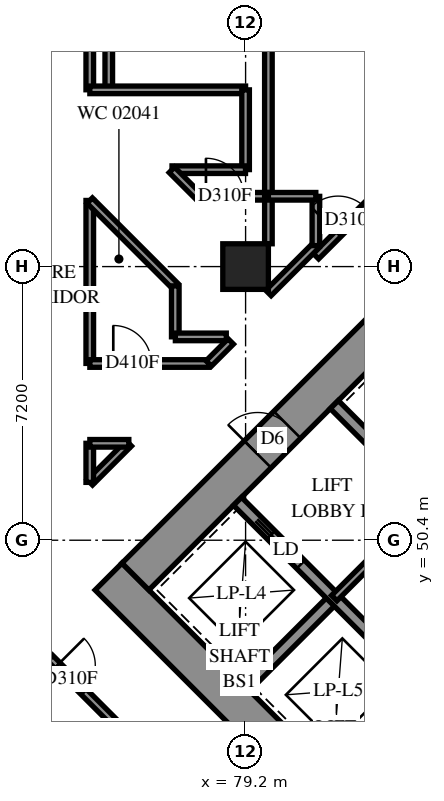
"""IFC4 building model, lengths in metres.
Left out: names, types, materials, properties, quantities, classifications, styles, units other than length and angle.
Written with IfcOpenShell. Run it as: python <this file> out.ifc"""

import sys

from ifc_helpers import new_model, si_unit, direction, frame, frame_2d, origin, origin_2d, place, context, subcontext, project, spatial, polyline, rectangle, outline, extrude, element, fill, save


model = new_model("IFC4")
c1 = context("Model", 3, precision=1e-05, world=origin(), true_north=direction((0.0, 1.0)))
c2 = subcontext(c1, "Body", "Model", "MODEL_VIEW")
j1 = project(units=[si_unit("LENGTHUNIT", "METRE"), si_unit("PLANEANGLEUNIT", "RADIAN")], contexts=[c1])
p1 = place(None, origin())
s1 = spatial("IfcSite", under=j1, at=p1, CompositionType="ELEMENT")
p2 = place(p1, origin())
s2 = spatial("IfcBuilding", under=s1, at=p2, CompositionType="ELEMENT")
p3 = place(p2, frame((0.0, 0.0, 10.2)))
s3 = spatial("IfcBuildingStorey", under=s2, at=p3, CompositionType="ELEMENT", Elevation=10.2)
p4 = place(p3, frame((79.2, 57.6, 0.0), z_axis=(0.0, 0.0, 1.0), x_axis=(1.0, 0.0, 0.0)))
e1 = element("IfcColumn", 1, at=p4, inside=s3, PredefinedType="COLUMN", context=c2, shape_type="SweptSolid", body=[
    extrude(rectangle(XDim=1.2, YDim=1.2, at=origin_2d()), origin(), (0.0, 0.0, 1.0), 3.8),
])
p5 = place(p3, frame((75.594, 49.443, -0.4), z_axis=(0.0, 0.0, 1.0), x_axis=(0.7071037324, -0.70710983, 0.0)))
e2 = element("IfcWall", 2, at=p5, inside=s3, PredefinedType="SHEAR", context=c2, shape_type="SweptSolid", body=[
    extrude(rectangle(XDim=16.4, YDim=1.0, at=frame_2d((8.2, 0.0))), origin(), (0.0, 0.0, 1.0), 3.5),
])
p6 = place(p3, frame((76.301, 49.443, -0.4), z_axis=(0.0, 0.0, 1.0), x_axis=(0.7071067812, 0.7071067812, 0.0)))
e3 = element("IfcWall", 3, at=p6, inside=s3, PredefinedType="SHEAR", context=c2, shape_type="SweptSolid", body=[
    extrude(rectangle(XDim=14.4, YDim=1.0, at=frame_2d((7.2, 0.0))), origin(), (0.0, 0.0, 1.0), 3.5),
])
p7 = place(p6, frame((4.55, 0.0, 0.4)))
e4 = element("IfcOpeningElement", 4, at=p7, cuts=e3, PredefinedType="OPENING", context=c2, shape_type="SweptSolid", body=[
    extrude(rectangle(XDim=1.1, YDim=2.1, at=frame_2d((0.55, 1.05))), frame((0.0, 0.51, 0.0), z_axis=(0.0, -1.0, 0.0), x_axis=(1.0, 0.0, 0.0)), (0.0, 0.0, 1.0), 1.02),
])
p8 = place(p6, frame((11.35, 0.0, 0.4)))
e5 = element("IfcOpeningElement", 5, at=p8, cuts=e3, PredefinedType="OPENING", context=c2, shape_type="SweptSolid", body=[
    extrude(rectangle(XDim=1.1, YDim=2.1, at=frame_2d((0.55, 1.05))), frame((0.0, 0.51, 0.0), z_axis=(0.0, -1.0, 0.0), x_axis=(1.0, 0.0, 0.0)), (0.0, 0.0, 1.0), 1.02),
])
p9 = place(p3, frame((79.2, 46.544, 0.0), z_axis=(0.0, 0.0, 1.0), x_axis=(0.7071219326, 0.7070916295, 0.0)))
e6 = element("IfcWall", 6, at=p9, inside=s3, PredefinedType="SOLIDWALL", context=c2, shape_type="SweptSolid", body=[
    extrude(rectangle(XDim=3.3, YDim=0.3, at=frame_2d((1.65, 0.0))), origin(), (0.0, 0.0, 1.0), 3.8),
])
p10 = place(p3, frame((81.746, 43.999, 0.0), z_axis=(0.0, 0.0, 1.0), x_axis=(0.7071067812, 0.7071067812, 0.0)))
e7 = element("IfcWall", 7, at=p10, inside=s3, PredefinedType="SOLIDWALL", context=c2, shape_type="SweptSolid", body=[
    extrude(rectangle(XDim=3.3, YDim=0.3, at=frame_2d((1.65, 0.0))), origin(), (0.0, 0.0, 1.0), 3.8),
])
p11 = place(p3, frame((78.988, 51.423, 0.0), z_axis=(0.0, 0.0, 1.0), x_axis=(0.7071067812, -0.7071067812, 0.0)))
e8 = element("IfcWall", 8, at=p11, inside=s3, PredefinedType="SOLIDWALL", context=c2, shape_type="SweptSolid", body=[
    extrude(rectangle(XDim=14.4, YDim=0.3, at=frame_2d((7.2, 0.0))), origin(), (0.0, 0.0, 1.0), 3.8),
])
p12 = place(p11, frame((1.25, 0.0, 0.0)))
e9 = element("IfcOpeningElement", 9, at=p12, cuts=e8, PredefinedType="OPENING", context=c2, shape_type="SweptSolid", body=[
    extrude(rectangle(XDim=1.1, YDim=2.1, at=frame_2d((0.55, 1.05))), frame((0.0, 0.16, 0.0), z_axis=(0.0, -1.0, 0.0), x_axis=(1.0, 0.0, 0.0)), (0.0, 0.0, 1.0), 0.32),
])
p13 = place(p11, frame((4.85, 0.0, 0.0)))
e10 = element("IfcOpeningElement", 10, at=p13, cuts=e8, PredefinedType="OPENING", context=c2, shape_type="SweptSolid", body=[
    extrude(rectangle(XDim=1.1, YDim=2.1, at=frame_2d((0.55, 1.05))), frame((0.0, 0.16, 0.0), z_axis=(0.0, -1.0, 0.0), x_axis=(1.0, 0.0, 0.0)), (0.0, 0.0, 1.0), 0.32),
])
p14 = place(p11, frame((8.45, 0.0, 0.0)))
e11 = element("IfcOpeningElement", 11, at=p14, cuts=e8, PredefinedType="OPENING", context=c2, shape_type="SweptSolid", body=[
    extrude(rectangle(XDim=1.1, YDim=2.1, at=frame_2d((0.55, 1.05))), frame((0.0, 0.16, 0.0), z_axis=(0.0, -1.0, 0.0), x_axis=(1.0, 0.0, 0.0)), (0.0, 0.0, 1.0), 0.32),
])
p15 = place(p11, frame((12.05, 0.0, 0.0)))
e12 = element("IfcOpeningElement", 12, at=p15, cuts=e8, PredefinedType="OPENING", context=c2, shape_type="SweptSolid", body=[
    extrude(rectangle(XDim=1.1, YDim=2.1, at=frame_2d((0.55, 1.05))), frame((0.0, 0.16, 0.0), z_axis=(0.0, -1.0, 0.0), x_axis=(1.0, 0.0, 0.0)), (0.0, 0.0, 1.0), 0.32),
])
p16 = place(p3, frame((81.534, 53.969, 0.0), z_axis=(0.0, 0.0, 1.0), x_axis=(0.707103309, -0.7071102534, 0.0)))
e13 = element("IfcWall", 13, at=p16, inside=s3, PredefinedType="SOLIDWALL", context=c2, shape_type="SweptSolid", body=[
    extrude(rectangle(XDim=14.4, YDim=0.3, at=frame_2d((7.2, 0.0))), origin(), (0.0, 0.0, 1.0), 3.8),
])
p17 = place(p16, frame((12.05, 0.0, 0.0)))
e14 = element("IfcOpeningElement", 14, at=p17, cuts=e13, PredefinedType="OPENING", context=c2, shape_type="SweptSolid", body=[
    extrude(rectangle(XDim=1.1, YDim=2.1, at=frame_2d((0.55, 1.05))), frame((0.0, 0.16, 0.0), z_axis=(0.0, -1.0, 0.0), x_axis=(1.0, 0.0, 0.0)), (0.0, 0.0, 1.0), 0.32),
])
p18 = place(p3, frame((117.843, 34.665, 0.0), z_axis=(0.0, 0.0, 1.0), x_axis=(-0.7071067812, 0.7071067812, 0.0)))
e15 = element("IfcWall", 15, at=p18, inside=s3, PredefinedType="SOLIDWALL", context=c2, shape_type="SweptSolid", body=[
    extrude(outline(polyline([(-0.275, -0.275), (54.222, -0.275), (53.994, 0.275), (0.275, 0.275), (-0.275, -0.275)])), origin(), (0.0, 0.0, 1.0), 3.8),
])
p19 = place(p18, frame((0.8, 0.0, 0.7)))
e16 = element("IfcOpeningElement", 16, at=p19, cuts=e15, PredefinedType="OPENING", context=c2, shape_type="SweptSolid", body=[
    extrude(rectangle(XDim=1.8, YDim=2.6, at=frame_2d((0.9, 1.3))), frame((0.0, 0.285, 0.0), z_axis=(0.0, -1.0, 0.0), x_axis=(1.0, 0.0, 0.0)), (0.0, 0.0, 1.0), 0.57),
])
p20 = place(p18, frame((4.225, 0.0, 0.7)))
e17 = element("IfcOpeningElement", 17, at=p20, cuts=e15, PredefinedType="OPENING", context=c2, shape_type="SweptSolid", body=[
    extrude(rectangle(XDim=1.8, YDim=2.6, at=frame_2d((0.9, 1.3))), frame((0.0, 0.285, 0.0), z_axis=(0.0, -1.0, 0.0), x_axis=(1.0, 0.0, 0.0)), (0.0, 0.0, 1.0), 0.57),
])
p21 = place(p18, frame((7.825, 0.0, 0.7)))
e18 = element("IfcOpeningElement", 18, at=p21, cuts=e15, PredefinedType="OPENING", context=c2, shape_type="SweptSolid", body=[
    extrude(rectangle(XDim=1.8, YDim=2.6, at=frame_2d((0.9, 1.3))), frame((0.0, 0.285, 0.0), z_axis=(0.0, -1.0, 0.0), x_axis=(1.0, 0.0, 0.0)), (0.0, 0.0, 1.0), 0.57),
])
p22 = place(p18, frame((11.425, 0.0, 0.7)))
e19 = element("IfcOpeningElement", 19, at=p22, cuts=e15, PredefinedType="OPENING", context=c2, shape_type="SweptSolid", body=[
    extrude(rectangle(XDim=1.8, YDim=2.6, at=frame_2d((0.9, 1.3))), frame((0.0, 0.285, 0.0), z_axis=(0.0, -1.0, 0.0), x_axis=(1.0, 0.0, 0.0)), (0.0, 0.0, 1.0), 0.57),
])
p23 = place(p18, frame((15.025, 0.0, 0.7)))
e20 = element("IfcOpeningElement", 20, at=p23, cuts=e15, PredefinedType="OPENING", context=c2, shape_type="SweptSolid", body=[
    extrude(rectangle(XDim=1.8, YDim=2.6, at=frame_2d((0.9, 1.3))), frame((0.0, 0.285, 0.0), z_axis=(0.0, -1.0, 0.0), x_axis=(1.0, 0.0, 0.0)), (0.0, 0.0, 1.0), 0.57),
])
p24 = place(p18, frame((18.625, 0.0, 0.7)))
e21 = element("IfcOpeningElement", 21, at=p24, cuts=e15, PredefinedType="OPENING", context=c2, shape_type="SweptSolid", body=[
    extrude(rectangle(XDim=1.8, YDim=2.6, at=frame_2d((0.9, 1.3))), frame((0.0, 0.285, 0.0), z_axis=(0.0, -1.0, 0.0), x_axis=(1.0, 0.0, 0.0)), (0.0, 0.0, 1.0), 0.57),
])
p25 = place(p18, frame((22.225, 0.0, 0.7)))
e22 = element("IfcOpeningElement", 22, at=p25, cuts=e15, PredefinedType="OPENING", context=c2, shape_type="SweptSolid", body=[
    extrude(rectangle(XDim=1.8, YDim=2.6, at=frame_2d((0.9, 1.3))), frame((0.0, 0.285, 0.0), z_axis=(0.0, -1.0, 0.0), x_axis=(1.0, 0.0, 0.0)), (0.0, 0.0, 1.0), 0.57),
])
p26 = place(p18, frame((25.825, 0.0, 0.7)))
e23 = element("IfcOpeningElement", 23, at=p26, cuts=e15, PredefinedType="OPENING", context=c2, shape_type="SweptSolid", body=[
    extrude(rectangle(XDim=1.8, YDim=2.6, at=frame_2d((0.9, 1.3))), frame((0.0, 0.285, 0.0), z_axis=(0.0, -1.0, 0.0), x_axis=(1.0, 0.0, 0.0)), (0.0, 0.0, 1.0), 0.57),
])
p27 = place(p18, frame((29.425, 0.0, 0.7)))
e24 = element("IfcOpeningElement", 24, at=p27, cuts=e15, PredefinedType="OPENING", context=c2, shape_type="SweptSolid", body=[
    extrude(rectangle(XDim=1.8, YDim=2.6, at=frame_2d((0.9, 1.3))), frame((0.0, 0.285, 0.0), z_axis=(0.0, -1.0, 0.0), x_axis=(1.0, 0.0, 0.0)), (0.0, 0.0, 1.0), 0.57),
])
p28 = place(p18, frame((33.025, 0.0, 0.7)))
e25 = element("IfcOpeningElement", 25, at=p28, cuts=e15, PredefinedType="OPENING", context=c2, shape_type="SweptSolid", body=[
    extrude(rectangle(XDim=1.8, YDim=2.6, at=frame_2d((0.9, 1.3))), frame((0.0, 0.285, 0.0), z_axis=(0.0, -1.0, 0.0), x_axis=(1.0, 0.0, 0.0)), (0.0, 0.0, 1.0), 0.57),
])
p29 = place(p18, frame((36.625, 0.0, 0.7)))
e26 = element("IfcOpeningElement", 26, at=p29, cuts=e15, PredefinedType="OPENING", context=c2, shape_type="SweptSolid", body=[
    extrude(rectangle(XDim=1.8, YDim=2.6, at=frame_2d((0.9, 1.3))), frame((0.0, 0.285, 0.0), z_axis=(0.0, -1.0, 0.0), x_axis=(1.0, 0.0, 0.0)), (0.0, 0.0, 1.0), 0.57),
])
p30 = place(p18, frame((40.225, 0.0, 0.7)))
e27 = element("IfcOpeningElement", 27, at=p30, cuts=e15, PredefinedType="OPENING", context=c2, shape_type="SweptSolid", body=[
    extrude(rectangle(XDim=1.8, YDim=2.6, at=frame_2d((0.9, 1.3))), frame((0.0, 0.285, 0.0), z_axis=(0.0, -1.0, 0.0), x_axis=(1.0, 0.0, 0.0)), (0.0, 0.0, 1.0), 0.57),
])
p31 = place(p18, frame((43.825, 0.0, 0.7)))
e28 = element("IfcOpeningElement", 28, at=p31, cuts=e15, PredefinedType="OPENING", context=c2, shape_type="SweptSolid", body=[
    extrude(rectangle(XDim=1.8, YDim=2.6, at=frame_2d((0.9, 1.3))), frame((0.0, 0.285, 0.0), z_axis=(0.0, -1.0, 0.0), x_axis=(1.0, 0.0, 0.0)), (0.0, 0.0, 1.0), 0.57),
])
p32 = place(p18, frame((47.425, 0.0, 0.7)))
e29 = element("IfcOpeningElement", 29, at=p32, cuts=e15, PredefinedType="OPENING", context=c2, shape_type="SweptSolid", body=[
    extrude(rectangle(XDim=1.8, YDim=2.6, at=frame_2d((0.9, 1.3))), frame((0.0, 0.285, 0.0), z_axis=(0.0, -1.0, 0.0), x_axis=(1.0, 0.0, 0.0)), (0.0, 0.0, 1.0), 0.57),
])
p33 = place(p18, frame((50.96, 0.0, 0.7)))
e30 = element("IfcOpeningElement", 30, at=p33, cuts=e15, PredefinedType="OPENING", context=c2, shape_type="SweptSolid", body=[
    extrude(rectangle(XDim=1.8, YDim=2.6, at=frame_2d((0.9, 1.3))), frame((0.0, 0.285, 0.0), z_axis=(0.0, -1.0, 0.0), x_axis=(1.0, 0.0, 0.0)), (0.0, 0.0, 1.0), 0.57),
])
p34 = place(p3, frame((81.534, 48.878, 0.0), z_axis=(0.0, 0.0, 1.0), x_axis=(0.707092892, 0.7071206701, 0.0)))
e31 = element("IfcWall", 31, at=p34, inside=s3, PredefinedType="PARTITIONING", context=c2, shape_type="SweptSolid", body=[
    extrude(rectangle(XDim=3.6, YDim=0.2, at=frame_2d((1.8, 0.0))), origin(), (0.0, 0.0, 1.0), 3.8),
])
p35 = place(p3, frame((75.6, 62.25, 0.0), z_axis=(0.0, 0.0, 1.0), x_axis=(0.0, 1.0, 0.0)))
e32 = element("IfcWall", 32, at=p35, inside=s3, PredefinedType="PARTITIONING", context=c2, shape_type="SweptSolid", body=[
    extrude(rectangle(XDim=10.4, YDim=0.2, at=frame_2d((5.2, 0.0))), origin(), (0.0, 0.0, 1.0), 3.8),
])
p36 = place(p3, frame((81.052, 57.873, 0.0), z_axis=(0.0, 0.0, 1.0), x_axis=(0.7071067812, 0.7071067812, 0.0)))
e33 = element("IfcWall", 33, at=p36, inside=s3, PredefinedType="PARTITIONING", context=c2, shape_type="SweptSolid", body=[
    extrude(rectangle(XDim=8.18, YDim=0.2, at=frame_2d((4.09, 0.0))), origin(), (0.0, 0.0, 1.0), 3.8),
])
p37 = place(p36, frame((0.823, 0.0, 0.0)))
e34 = element("IfcOpeningElement", 34, at=p37, cuts=e33, PredefinedType="OPENING", context=c2, shape_type="SweptSolid", body=[
    extrude(rectangle(XDim=1.0, YDim=2.1, at=frame_2d((0.5, 1.05))), frame((0.0, 0.11, 0.0), z_axis=(0.0, -1.0, 0.0), x_axis=(1.0, 0.0, 0.0)), (0.0, 0.0, 1.0), 0.22),
])
p38 = place(p3, frame((75.1, 62.252, 0.0), z_axis=(0.0, 0.0, 1.0), x_axis=(0.0, 1.0, 0.0)))
e35 = element("IfcWall", 35, at=p38, inside=s3, PredefinedType="PARTITIONING", context=c2, shape_type="SweptSolid", body=[
    extrude(rectangle(XDim=5.648, YDim=0.2, at=frame_2d((2.824, 0.0))), origin(), (0.0, 0.0, 1.0), 3.8),
])
p39 = place(p3, frame((79.8, 59.45, 0.0), z_axis=(0.0, 0.0, 1.0), x_axis=(0.0, 1.0, 0.0)))
e36 = element("IfcWall", 36, at=p39, inside=s3, PredefinedType="PARTITIONING", context=c2, shape_type="SweptSolid", body=[
    extrude(rectangle(XDim=4.75, YDim=0.2, at=frame_2d((2.375, 0.0))), origin(), (0.0, 0.0, 1.0), 3.8),
])
p40 = place(p3, frame((74.057, 47.297, 0.0), z_axis=(0.0, 0.0, 1.0), x_axis=(0.7071067812, -0.7071067812, 0.0)))
e37 = element("IfcWall", 37, at=p40, inside=s3, PredefinedType="PARTITIONING", context=c2, shape_type="SweptSolid", body=[
    extrude(rectangle(XDim=4.653, YDim=0.2, at=frame_2d((2.326, 0.0))), origin(), (0.0, 0.0, 1.0), 3.8),
])
p41 = place(p40, frame((0.267, 0.0, 0.0)))
e38 = element("IfcOpeningElement", 38, at=p41, cuts=e37, PredefinedType="OPENING", context=c2, shape_type="SweptSolid", body=[
    extrude(rectangle(XDim=1.0, YDim=2.1, at=frame_2d((0.5, 1.05))), frame((0.0, 0.11, 0.0), z_axis=(0.0, -1.0, 0.0), x_axis=(1.0, 0.0, 0.0)), (0.0, 0.0, 1.0), 0.22),
])
p42 = place(p3, frame((75.1, 55.052, 0.0), z_axis=(0.0, 0.0, 1.0), x_axis=(0.0, 1.0, 0.0)))
e39 = element("IfcWall", 39, at=p42, inside=s3, PredefinedType="PARTITIONING", context=c2, shape_type="SweptSolid", body=[
    extrude(rectangle(XDim=4.288, YDim=0.2, at=frame_2d((2.144, 0.0))), origin(), (0.0, 0.0, 1.0), 3.8),
])
p43 = place(p3, frame((75.102, 62.25, 0.0), z_axis=(0.0, 0.0, 1.0), x_axis=(1.0, 0.0, 0.0)))
e40 = element("IfcWall", 40, at=p43, inside=s3, PredefinedType="PARTITIONING", context=c2, shape_type="SweptSolid", body=[
    extrude(rectangle(XDim=4.098, YDim=0.2, at=frame_2d((2.049, 0.0))), origin(), (0.0, 0.0, 1.0), 3.8),
])
p44 = place(p3, frame((75.099, 59.337, 0.0), z_axis=(0.0, 0.0, 1.0), x_axis=(0.7071067812, -0.7071067812, 0.0)))
e41 = element("IfcWall", 41, at=p44, inside=s3, PredefinedType="PARTITIONING", context=c2, shape_type="SweptSolid", body=[
    extrude(rectangle(XDim=3.179, YDim=0.2, at=frame_2d((1.59, 0.0))), origin(), (0.0, 0.0, 1.0), 3.8),
])
p45 = place(p3, frame((75.102, 55.05, 0.0), z_axis=(0.0, 0.0, 1.0), x_axis=(1.0, 0.0, 0.0)))
e42 = element("IfcWall", 42, at=p45, inside=s3, PredefinedType="PARTITIONING", context=c2, shape_type="SweptSolid", body=[
    extrude(rectangle(XDim=3.128, YDim=0.2, at=frame_2d((1.564, 0.0))), origin(), (0.0, 0.0, 1.0), 3.8),
])
p46 = place(p45, frame((0.617, 0.0, 0.0)))
e43 = element("IfcOpeningElement", 43, at=p46, cuts=e42, PredefinedType="OPENING", context=c2, shape_type="SweptSolid", body=[
    extrude(rectangle(XDim=1.0, YDim=2.1, at=frame_2d((0.5, 1.05))), frame((0.0, 0.11, 0.0), z_axis=(0.0, -1.0, 0.0), x_axis=(1.0, 0.0, 0.0)), (0.0, 0.0, 1.0), 0.22),
])
p47 = place(p3, frame((79.2, 60.152, 0.0), z_axis=(0.0, 0.0, 1.0), x_axis=(0.0, 1.0, 0.0)))
e44 = element("IfcWall", 44, at=p47, inside=s3, PredefinedType="PARTITIONING", context=c2, shape_type="SweptSolid", body=[
    extrude(rectangle(XDim=2.098, YDim=0.2, at=frame_2d((1.049, 0.0))), origin(), (0.0, 0.0, 1.0), 3.8),
])
p48 = place(p3, frame((77.264, 60.15, 0.0), z_axis=(0.0, 0.0, 1.0), x_axis=(1.0, 0.0, 0.0)))
e45 = element("IfcWall", 45, at=p48, inside=s3, PredefinedType="PARTITIONING", context=c2, shape_type="SweptSolid", body=[
    extrude(rectangle(XDim=1.934, YDim=0.2, at=frame_2d((0.967, 0.0))), origin(), (0.0, 0.0, 1.0), 3.8),
])
p49 = place(p3, frame((77.962, 59.45, 0.0), z_axis=(0.0, 0.0, 1.0), x_axis=(1.0, 0.0, 0.0)))
e46 = element("IfcWall", 46, at=p49, inside=s3, PredefinedType="PARTITIONING", context=c2, shape_type="SweptSolid", body=[
    extrude(rectangle(XDim=1.838, YDim=0.2, at=frame_2d((0.919, 0.0))), origin(), (0.0, 0.0, 1.0), 3.8),
])
p50 = place(p49, frame((0.195, 0.0, 0.0)))
e47 = element("IfcOpeningElement", 47, at=p50, cuts=e46, PredefinedType="OPENING", context=c2, shape_type="SweptSolid", body=[
    extrude(rectangle(XDim=1.0, YDim=2.1, at=frame_2d((0.5, 1.05))), frame((0.0, 0.11, 0.0), z_axis=(0.0, -1.0, 0.0), x_axis=(1.0, 0.0, 0.0)), (0.0, 0.0, 1.0), 0.22),
])
p51 = place(p3, frame((79.801, 56.905, 0.0), z_axis=(0.0, 0.0, 1.0), x_axis=(0.7071067812, 0.7071067812, 0.0)))
e48 = element("IfcWall", 48, at=p51, inside=s3, PredefinedType="PARTITIONING", context=c2, shape_type="SweptSolid", body=[
    extrude(rectangle(XDim=1.765, YDim=0.2, at=frame_2d((0.882, 0.0))), origin(), (0.0, 0.0, 1.0), 3.8),
])
p52 = place(p3, frame((75.102, 51.922, 0.0), z_axis=(0.0, 0.0, 1.0), x_axis=(0.7071067812, 0.7071067812, 0.0)))
e49 = element("IfcWall", 49, at=p52, inside=s3, PredefinedType="PARTITIONING", context=c2, shape_type="SweptSolid", body=[
    extrude(rectangle(XDim=1.451, YDim=0.2, at=frame_2d((0.726, 0.0))), origin(), (0.0, 0.0, 1.0), 3.8),
])
for number, where, z_axis, x_axis in (
    (50, (77.35, 55.752, 0.0), (0.0, 0.0, 1.0), (0.0, 1.0, 0.0)),
    (51, (77.352, 55.75, 0.0), (0.0, 0.0, 1.0), (1.0, 0.0, 0.0)),
):
    element("IfcWall", number, at=place(p3, frame(where, z_axis=z_axis, x_axis=x_axis)), inside=s3, PredefinedType="PARTITIONING", context=c2, shape_type="SweptSolid", body=[
        extrude(rectangle(XDim=1.34, YDim=0.2, at=frame_2d((0.67, 0.0))), origin(), (0.0, 0.0, 1.0), 3.8),
    ])
p53 = place(p3, frame((81.05, 58.152, 0.0), z_axis=(0.0, 0.0, 1.0), x_axis=(0.0, 1.0, 0.0)))
e52 = element("IfcWall", 52, at=p53, inside=s3, PredefinedType="PARTITIONING", context=c2, shape_type="SweptSolid", body=[
    extrude(rectangle(XDim=1.296, YDim=0.2, at=frame_2d((0.648, 0.0))), origin(), (0.0, 0.0, 1.0), 3.8),
])
p54 = place(p3, frame((79.8, 58.2, 0.0), z_axis=(0.0, 0.0, 1.0), x_axis=(0.0, 1.0, 0.0)))
e53 = element("IfcWall", 53, at=p54, inside=s3, PredefinedType="PARTITIONING", context=c2, shape_type="SweptSolid", body=[
    extrude(rectangle(XDim=1.25, YDim=0.2, at=frame_2d((0.625, 0.0))), origin(), (0.0, 0.0, 1.0), 3.8),
])
p55 = place(p3, frame((79.8, 59.45, 0.0), z_axis=(0.0, 0.0, 1.0), x_axis=(1.0, 0.0, 0.0)))
e54 = element("IfcWall", 54, at=p55, inside=s3, PredefinedType="PARTITIONING", context=c2, shape_type="SweptSolid", body=[
    extrude(rectangle(XDim=1.248, YDim=0.2, at=frame_2d((0.624, 0.0))), origin(), (0.0, 0.0, 1.0), 3.8),
])
p56 = place(p3, frame((75.1, 51.922, 0.0), z_axis=(0.0, 0.0, 1.0), x_axis=(0.0, 1.0, 0.0)))
e55 = element("IfcWall", 55, at=p56, inside=s3, PredefinedType="PARTITIONING", context=c2, shape_type="SweptSolid", body=[
    extrude(rectangle(XDim=1.028, YDim=0.2, at=frame_2d((0.514, 0.0))), origin(), (0.0, 0.0, 1.0), 3.8),
])
p57 = place(p3, frame((75.102, 52.95, 0.0), z_axis=(0.0, 0.0, 1.0), x_axis=(1.0, 0.0, 0.0)))
e56 = element("IfcWall", 56, at=p57, inside=s3, PredefinedType="PARTITIONING", context=c2, shape_type="SweptSolid", body=[
    extrude(rectangle(XDim=1.026, YDim=0.2, at=frame_2d((0.513, 0.0))), origin(), (0.0, 0.0, 1.0), 3.8),
])
p58 = place(p3, frame((77.26, 60.145, 0.0), z_axis=(0.0, 0.0, 1.0), x_axis=(0.7071067812, -0.7071067812, 0.0)))
e57 = element("IfcWall", 57, at=p58, inside=s3, PredefinedType="PARTITIONING", context=c2, shape_type="SweptSolid", body=[
    extrude(rectangle(XDim=0.987, YDim=0.2, at=frame_2d((0.493, 0.0))), origin(), (0.0, 0.0, 1.0), 3.8),
])
p59 = place(p3, frame((78.23, 55.05, 0.0), z_axis=(0.0, 0.0, 1.0), x_axis=(0.7071067812, 0.7071067812, 0.0)))
e58 = element("IfcWall", 58, at=p59, inside=s3, PredefinedType="PARTITIONING", context=c2, shape_type="SweptSolid", body=[
    extrude(rectangle(XDim=0.82, YDim=0.2, at=frame_2d((0.41, 0.0))), origin(), (0.0, 0.0, 1.0), 3.8),
])
p60 = place(p7, origin())
e59 = element("IfcDoor", 59, at=p60, inside=s3, OperationType="DOUBLE_DOOR_SINGLE_SWING", PredefinedType="DOOR", context=c2, shape_type="SweptSolid", body=[
    extrude(rectangle(XDim=1.1, YDim=2.1, at=frame_2d((0.55, 1.05))), frame((0.0, 0.025, 0.0), z_axis=(0.0, -1.0, 0.0), x_axis=(1.0, 0.0, 0.0)), (0.0, 0.0, 1.0), 0.05),
])
fill(e4, e59)
p61 = place(p12, origin())
e60 = element("IfcDoor", 60, at=p61, inside=s3, OperationType="SLIDING_TO_LEFT", PredefinedType="DOOR", context=c2, shape_type="SweptSolid", body=[
    extrude(rectangle(XDim=1.1, YDim=2.1, at=frame_2d((0.55, 1.05))), frame((0.0, 0.025, 0.0), z_axis=(0.0, -1.0, 0.0), x_axis=(1.0, 0.0, 0.0)), (0.0, 0.0, 1.0), 0.05),
])
fill(e9, e60)
p62 = place(p41, origin())
e61 = element("IfcDoor", 61, at=p62, inside=s3, OperationType="SINGLE_SWING_LEFT", PredefinedType="DOOR", context=c2, shape_type="SweptSolid", body=[
    extrude(rectangle(XDim=1.0, YDim=2.1, at=frame_2d((0.5, 1.05))), frame((0.0, 0.025, 0.0), z_axis=(0.0, -1.0, 0.0), x_axis=(1.0, 0.0, 0.0)), (0.0, 0.0, 1.0), 0.05),
])
fill(e38, e61)
p63 = place(p46, origin())
e62 = element("IfcDoor", 62, at=p63, inside=s3, OperationType="SINGLE_SWING_LEFT", PredefinedType="DOOR", context=c2, shape_type="SweptSolid", body=[
    extrude(rectangle(XDim=1.0, YDim=2.1, at=frame_2d((0.5, 1.05))), frame((0.0, 0.025, 0.0), z_axis=(0.0, -1.0, 0.0), x_axis=(1.0, 0.0, 0.0)), (0.0, 0.0, 1.0), 0.05),
])
fill(e43, e62)
p64 = place(p50, origin())
e63 = element("IfcDoor", 63, at=p64, inside=s3, OperationType="SINGLE_SWING_LEFT", PredefinedType="DOOR", context=c2, shape_type="SweptSolid", body=[
    extrude(rectangle(XDim=1.0, YDim=2.1, at=frame_2d((0.5, 1.05))), frame((0.0, 0.025, 0.0), z_axis=(0.0, -1.0, 0.0), x_axis=(1.0, 0.0, 0.0)), (0.0, 0.0, 1.0), 0.05),
])
fill(e47, e63)
p65 = place(p37, origin())
e64 = element("IfcDoor", 64, at=p65, inside=s3, OperationType="SINGLE_SWING_RIGHT", PredefinedType="DOOR", context=c2, shape_type="SweptSolid", body=[
    extrude(rectangle(XDim=1.0, YDim=2.1, at=frame_2d((0.5, 1.05))), frame((0.0, 0.025, 0.0), z_axis=(0.0, -1.0, 0.0), x_axis=(1.0, 0.0, 0.0)), (0.0, 0.0, 1.0), 0.05),
])
fill(e34, e64)
save(model, sys.argv[1])
